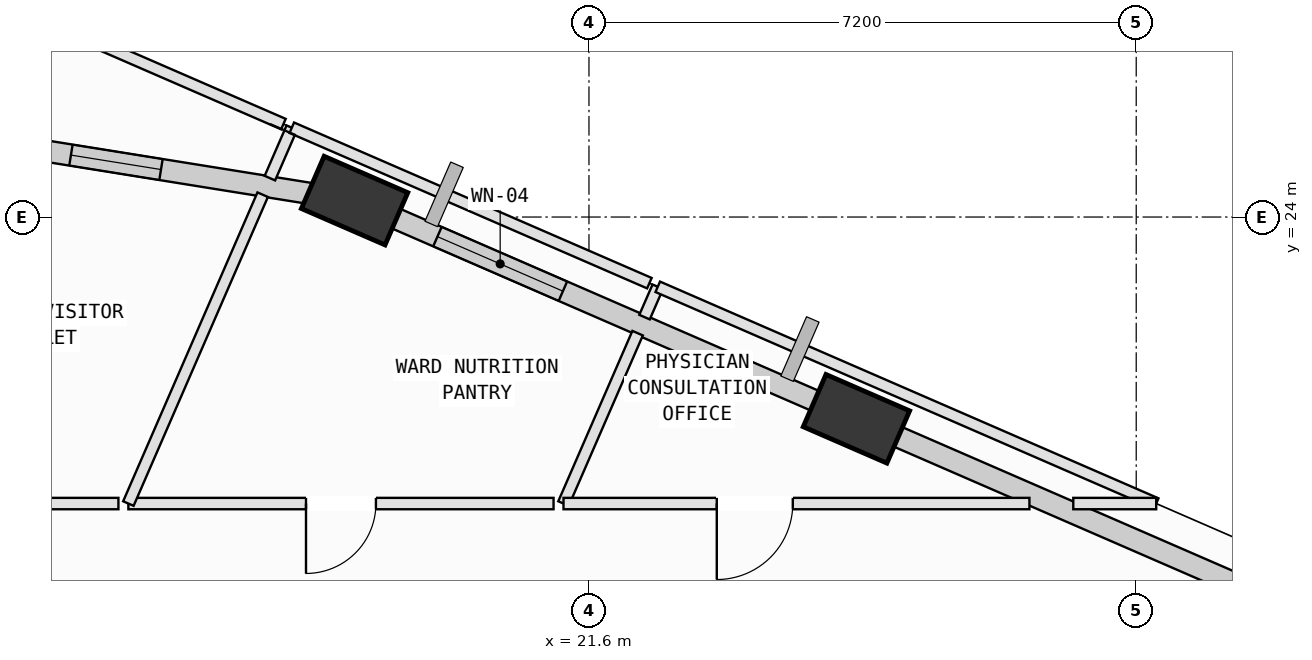
"""IFC4 building model, lengths in metres.
Left out: names, types, materials, properties, quantities, classifications, styles, units other than length and angle.
Written with IfcOpenShell. Run it as: python <this file> out.ifc"""

import sys

from ifc_helpers import new_model, si_unit, direction, frame, frame_2d, origin, origin_2d, place, context, subcontext, project, spatial, rectangle, extrude, element, fill, save


model = new_model("IFC4")
c1 = context("Model", 3, precision=1e-05, world=origin(), true_north=direction((0.0, 1.0)))
c2 = subcontext(c1, "Body", "Model", "MODEL_VIEW")
j1 = project(units=[si_unit("LENGTHUNIT", "METRE"), si_unit("PLANEANGLEUNIT", "RADIAN")], contexts=[c1])
p1 = place(None, origin())
s1 = spatial("IfcSite", under=j1, at=p1, CompositionType="ELEMENT")
p2 = place(p1, origin())
s2 = spatial("IfcBuilding", under=s1, at=p2, CompositionType="ELEMENT")
p3 = place(p2, frame((0.0, 0.0, 320.6)))
s3 = spatial("IfcBuildingStorey", under=s2, at=p3, CompositionType="ELEMENT", Elevation=320.6)
for number, where, z_axis, x_axis in (
    (1, (25.119, 21.345, 0.002), (0.0, 0.0, 1.0), (-0.917, 0.399, 0.0)),
    (2, (18.516, 24.216, 0.002), (0.0, 0.0, 1.0), (-0.917, 0.399, 0.0)),
):
    element("IfcColumn", number, at=place(p3, frame(where, z_axis=z_axis, x_axis=x_axis)), inside=s3, PredefinedType="COLUMN", context=c2, shape_type="SweptSolid", body=[
        extrude(rectangle(XDim=1.2, YDim=0.75, at=origin_2d()), origin(), (0.0, 0.0, 1.0), 3.996),
    ])
p4 = place(p3, frame((25.484, 21.187, 0.0), z_axis=(0.0, 0.0, 1.0), x_axis=(0.917060568388, -0.398747932794, 0.0)))
e3 = element("IfcWall", 3, at=p4, inside=s3, PredefinedType="SOLIDWALL", context=c2, shape_type="SweptSolid", body=[
    extrude(rectangle(XDim=6.955, YDim=0.28, at=frame_2d((3.478, 0.0))), origin(), (0.0, 0.0, 1.0), 2.765),
])
p5 = place(p3, frame((18.881, 24.058, 0.0), z_axis=(0.0, 0.0, 1.0), x_axis=(0.917070056253, -0.398726111414, 0.0)))
e4 = element("IfcWall", 4, at=p5, inside=s3, PredefinedType="SOLIDWALL", context=c2, shape_type="SweptSolid", body=[
    extrude(rectangle(XDim=6.405, YDim=0.28, at=frame_2d((3.202, 0.0))), origin(), (0.0, 0.0, 1.0), 3.265),
])
p6 = place(p5, frame((0.791, 0.0, 0.75)))
e5 = element("IfcOpeningElement", 5, at=p6, cuts=e4, PredefinedType="OPENING", context=c2, shape_type="SweptSolid", body=[
    extrude(rectangle(XDim=1.8, YDim=2.05, at=frame_2d((0.9, 1.025))), frame((0.0, 0.15, 0.0), z_axis=(0.0, -1.0, 0.0), x_axis=(1.0, 0.0, 0.0)), (0.0, 0.0, 1.0), 0.3),
])
p7 = place(p3, frame((12.946, 25.11, 0.0), z_axis=(0.0, 0.0, 1.0), x_axis=(0.987363821305, -0.158469821666, 0.0)))
e6 = element("IfcWall", 6, at=p7, inside=s3, PredefinedType="SOLIDWALL", context=c2, shape_type="SweptSolid", body=[
    extrude(rectangle(XDim=5.244, YDim=0.28, at=frame_2d((2.622, 0.0))), origin(), (0.0, 0.0, 1.0), 3.265),
])
p8 = place(p7, frame((1.862, 0.0, 0.75)))
e7 = element("IfcOpeningElement", 7, at=p8, cuts=e6, PredefinedType="OPENING", context=c2, shape_type="SweptSolid", body=[
    extrude(rectangle(XDim=1.2, YDim=1.75, at=frame_2d((0.6, 0.875))), frame((0.0, 0.15, 0.0), z_axis=(0.0, -1.0, 0.0), x_axis=(1.0, 0.0, 0.0)), (0.0, 0.0, 1.0), 0.3),
])
p9 = place(p3, frame((21.265, 20.23, 0.0), z_axis=(0.0, 0.0, 1.0), x_axis=(0.398842956111, 0.91701924536, 0.0)))
e8 = element("IfcWall", 8, at=p9, inside=s3, PredefinedType="PARTITIONING", context=c2, shape_type="SweptSolid", body=[
    extrude(rectangle(XDim=2.445, YDim=0.15, at=frame_2d((1.222, 0.0))), origin(), (0.0, 0.0, 1.0), 3.78),
])
p10 = place(p3, frame((22.331, 22.683, 0.0), z_axis=(0.0, 0.0, 1.0), x_axis=(0.399464528742, 0.916748651636, 0.0)))
e9 = element("IfcWall", 9, at=p10, inside=s3, PredefinedType="PARTITIONING", context=c2, shape_type="SweptSolid", body=[
    extrude(rectangle(XDim=0.435, YDim=0.15, at=frame_2d((0.218, 0.0))), origin(), (0.0, 0.0, 1.0), 3.78),
])
p11 = place(p3, frame((22.505, 23.082, 0.0), z_axis=(0.0, 0.0, 1.0), x_axis=(0.917034231322, -0.398808498634, 0.0)))
e10 = element("IfcWall", 10, at=p11, inside=s3, PredefinedType="PARTITIONING", context=c2, shape_type="SweptSolid", body=[
    extrude(rectangle(XDim=7.151, YDim=0.15, at=frame_2d((3.576, 0.0))), origin(), (0.0, 0.0, 1.0), 3.78),
])
p12 = place(p3, frame((29.063, 20.23, 0.0), z_axis=(0.0, 0.0, 1.0), x_axis=(-1.0, 0.0, 0.0)))
e11 = element("IfcWall", 11, at=p12, inside=s3, PredefinedType="PARTITIONING", context=c2, shape_type="SweptSolid", body=[
    extrude(rectangle(XDim=1.091, YDim=0.15, at=frame_2d((0.545, 0.0))), origin(), (0.0, 0.0, 1.0), 3.78),
])
p13 = place(p3, frame((27.395, 20.23, 0.0), z_axis=(0.0, 0.0, 1.0), x_axis=(-1.0, 0.0, 0.0)))
e12 = element("IfcWall", 12, at=p13, inside=s3, PredefinedType="PARTITIONING", context=c2, shape_type="SweptSolid", body=[
    extrude(rectangle(XDim=6.13, YDim=0.15, at=frame_2d((3.065, 0.0))), origin(), (0.0, 0.0, 1.0), 3.78),
])
p14 = place(p13, frame((3.113, 0.0, 0.0)))
e13 = element("IfcOpeningElement", 13, at=p14, cuts=e12, PredefinedType="OPENING", context=c2, shape_type="SweptSolid", body=[
    extrude(rectangle(XDim=1.0, YDim=2.12, at=frame_2d((0.5, 1.06))), frame((0.0, 0.085, 0.0), z_axis=(0.0, -1.0, 0.0), x_axis=(1.0, 0.0, 0.0)), (0.0, 0.0, 1.0), 0.17),
])
p15 = place(p3, frame((21.134, 20.23, 0.0), z_axis=(0.0, 0.0, 1.0), x_axis=(-1.0, 0.0, 0.0)))
e14 = element("IfcWall", 14, at=p15, inside=s3, PredefinedType="PARTITIONING", context=c2, shape_type="SweptSolid", body=[
    extrude(rectangle(XDim=5.594, YDim=0.15, at=frame_2d((2.797, 0.0))), origin(), (0.0, 0.0, 1.0), 3.415),
])
p16 = place(p15, frame((2.337, 0.0, 0.0)))
e15 = element("IfcOpeningElement", 15, at=p16, cuts=e14, PredefinedType="OPENING", context=c2, shape_type="SweptSolid", body=[
    extrude(rectangle(XDim=0.92, YDim=2.1, at=frame_2d((0.46, 1.05))), frame((0.0, 0.085, 0.0), z_axis=(0.0, -1.0, 0.0), x_axis=(1.0, 0.0, 0.0)), (0.0, 0.0, 1.0), 0.17),
])
p17 = place(p3, frame((15.54, 20.23, 0.0), z_axis=(0.0, 0.0, 1.0), x_axis=(0.398707980575, 0.917077939014, 0.0)))
e16 = element("IfcWall", 16, at=p17, inside=s3, PredefinedType="PARTITIONING", context=c2, shape_type="SweptSolid", body=[
    extrude(rectangle(XDim=4.431, YDim=0.15, at=frame_2d((2.216, 0.0))), origin(), (0.0, 0.0, 1.0), 2.765),
])
p18 = place(p3, frame((17.402, 24.512, 0.0), z_axis=(0.0, 0.0, 1.0), x_axis=(0.398195004061, 0.917300789677, 0.0)))
e17 = element("IfcWall", 17, at=p18, inside=s3, PredefinedType="PARTITIONING", context=c2, shape_type="SweptSolid", body=[
    extrude(rectangle(XDim=0.723, YDim=0.15, at=frame_2d((0.361, 0.0))), origin(), (0.0, 0.0, 1.0), 3.78),
])
p19 = place(p3, frame((17.69, 25.175, 0.0), z_axis=(0.0, 0.0, 1.0), x_axis=(0.917107123666, -0.398640845525, 0.0)))
e18 = element("IfcWall", 18, at=p19, inside=s3, PredefinedType="PARTITIONING", context=c2, shape_type="SweptSolid", body=[
    extrude(rectangle(XDim=5.13, YDim=0.15, at=frame_2d((2.565, 0.0))), origin(), (0.0, 0.0, 1.0), 3.78),
])
p20 = place(p3, frame((14.288, 26.654, 0.0), z_axis=(0.0, 0.0, 1.0), x_axis=(0.917085193586, -0.398691293741, 0.0)))
e19 = element("IfcWall", 19, at=p20, inside=s3, PredefinedType="PARTITIONING", context=c2, shape_type="SweptSolid", body=[
    extrude(rectangle(XDim=3.59, YDim=0.15, at=frame_2d((1.795, 0.0))), origin(), (0.0, 0.0, 1.0), 3.78),
])
p21 = place(p3, frame((15.409, 20.23, 0.0), z_axis=(0.0, 0.0, 1.0), x_axis=(-1.0, 0.0, 0.0)))
e20 = element("IfcWall", 20, at=p21, inside=s3, PredefinedType="PARTITIONING", context=c2, shape_type="SweptSolid", body=[
    extrude(rectangle(XDim=2.897, YDim=0.15, at=frame_2d((1.448, 0.0))), origin(), (0.0, 0.0, 1.0), 3.415),
])
p22 = place(p21, frame((0.989, 0.0, 0.0)))
e21 = element("IfcOpeningElement", 21, at=p22, cuts=e20, PredefinedType="OPENING", context=c2, shape_type="SweptSolid", body=[
    extrude(rectangle(XDim=0.92, YDim=2.1, at=frame_2d((0.46, 1.05))), frame((0.0, 0.085, 0.0), z_axis=(0.0, -1.0, 0.0), x_axis=(1.0, 0.0, 0.0)), (0.0, 0.0, 1.0), 0.17),
])
p23 = place(p6, origin())
e22 = element("IfcWindow", 22, at=p23, inside=s3, PartitioningType="SINGLE_PANEL", PredefinedType="WINDOW", context=c2, shape_type="SweptSolid", body=[
    extrude(rectangle(XDim=1.8, YDim=2.05, at=frame_2d((0.9, 1.025))), frame((0.0, 0.03, 0.0), z_axis=(0.0, -1.0, 0.0), x_axis=(1.0, 0.0, 0.0)), (0.0, 0.0, 1.0), 0.06),
])
fill(e5, e22)
p24 = place(p8, origin())
e23 = element("IfcWindow", 23, at=p24, inside=s3, PartitioningType="SINGLE_PANEL", PredefinedType="WINDOW", context=c2, shape_type="SweptSolid", body=[
    extrude(rectangle(XDim=1.2, YDim=1.75, at=frame_2d((0.6, 0.875))), frame((0.0, 0.03, 0.0), z_axis=(0.0, -1.0, 0.0), x_axis=(1.0, 0.0, 0.0)), (0.0, 0.0, 1.0), 0.06),
])
fill(e7, e23)
p25 = place(p14, origin())
e24 = element("IfcDoor", 24, at=p25, inside=s3, OperationType="SINGLE_SWING_RIGHT", PredefinedType="DOOR", context=c2, shape_type="SweptSolid", body=[
    extrude(rectangle(XDim=1.0, YDim=2.12, at=frame_2d((0.5, 1.06))), frame((0.0, 0.025, 0.0), z_axis=(0.0, -1.0, 0.0), x_axis=(1.0, 0.0, 0.0)), (0.0, 0.0, 1.0), 0.05),
])
fill(e13, e24)
p26 = place(p16, origin())
e25 = element("IfcDoor", 25, at=p26, inside=s3, OperationType="SINGLE_SWING_RIGHT", PredefinedType="DOOR", context=c2, shape_type="SweptSolid", body=[
    extrude(rectangle(XDim=0.92, YDim=2.1, at=frame_2d((0.46, 1.05))), frame((0.0, 0.025, 0.0), z_axis=(0.0, -1.0, 0.0), x_axis=(1.0, 0.0, 0.0)), (0.0, 0.0, 1.0), 0.05),
])
fill(e15, e25)
save(model, sys.argv[1])
